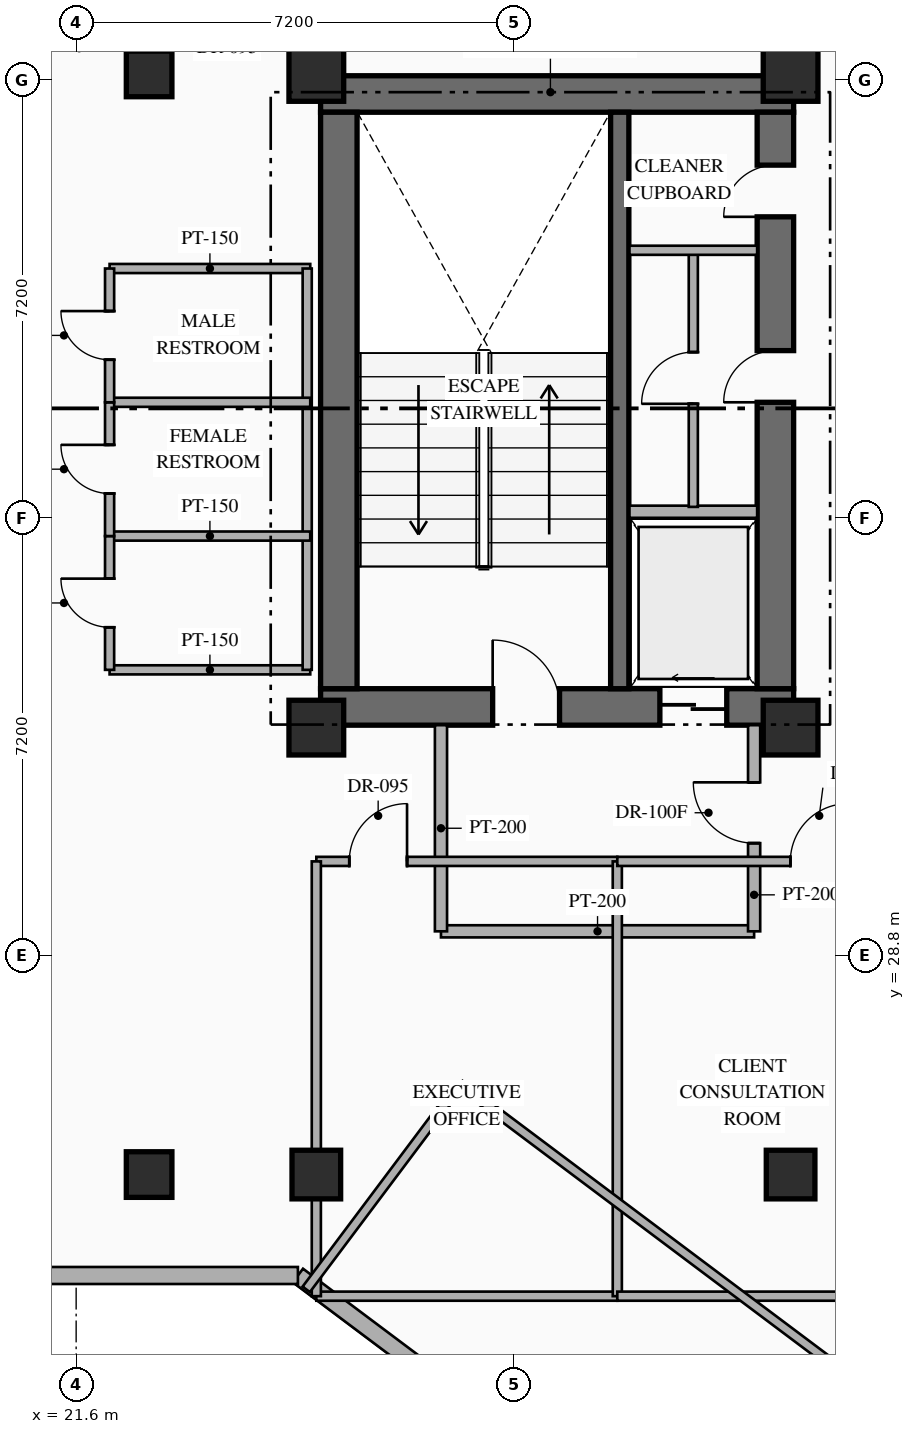
"""IFC4 building model, lengths in metres.
Left out: names, types, materials, properties, quantities, classifications, styles, units other than length and angle.
Written with IfcOpenShell. Run it as: python <this file> out.ifc"""

import sys

from ifc_helpers import new_model, si_unit, direction, frame, frame_2d, origin, origin_2d, place, context, subcontext, project, spatial, rectangle, hollow_rectangle, extrude, element, fill, save


model = new_model("IFC4")
c1 = context("Model", 3, precision=1e-05, world=origin(), true_north=direction((0.0, 1.0)))
c2 = subcontext(c1, "Body", "Model", "MODEL_VIEW")
j1 = project(units=[si_unit("LENGTHUNIT", "METRE"), si_unit("PLANEANGLEUNIT", "RADIAN")], contexts=[c1])
p1 = place(None, origin())
s1 = spatial("IfcSite", under=j1, at=p1, CompositionType="ELEMENT")
p2 = place(p1, origin())
s2 = spatial("IfcBuilding", under=s1, at=p2, CompositionType="ELEMENT")
p3 = place(p2, frame((0.0, 0.0, 174.45)))
s3 = spatial("IfcBuildingStorey", under=s2, at=p3, CompositionType="ELEMENT", Elevation=174.45)
p4 = place(p3, frame((25.62, 32.89, 0.0), z_axis=(0.0, 0.0, 1.0), x_axis=(1.0, 0.0, 0.0)))
e1 = element("IfcWall", 1, at=p4, inside=s3, PredefinedType="SHEAR", context=c2, shape_type="SweptSolid", body=[
    extrude(rectangle(XDim=7.78, YDim=0.6, at=frame_2d((3.89, 0.0))), origin(), (0.0, 0.0, 1.0), 3.6),
])
p5 = place(p4, frame((2.83, 0.0, 0.0)))
e2 = element("IfcOpeningElement", 2, at=p5, cuts=e1, PredefinedType="OPENING", context=c2, shape_type="SweptSolid", body=[
    extrude(rectangle(XDim=1.1, YDim=2.2, at=frame_2d((0.55, 1.1))), frame((0.0, 0.31, 0.0), z_axis=(0.0, -1.0, 0.0), x_axis=(1.0, 0.0, 0.0)), (0.0, 0.0, 1.0), 0.62),
])
p6 = place(p4, frame((5.58, 0.0, 0.0)))
e3 = element("IfcOpeningElement", 3, at=p6, cuts=e1, PredefinedType="OPENING", context=c2, shape_type="SweptSolid", body=[
    extrude(rectangle(XDim=1.1, YDim=2.15, at=frame_2d((0.55, 1.075))), frame((0.0, 0.31, 0.0), z_axis=(0.0, -1.0, 0.0), x_axis=(1.0, 0.0, 0.0)), (0.0, 0.0, 1.0), 0.62),
])
p7 = place(p3, frame((25.62, 42.97, 0.0), z_axis=(0.0, 0.0, 1.0), x_axis=(1.0, 0.0, 0.0)))
e4 = element("IfcWall", 4, at=p7, inside=s3, PredefinedType="SHEAR", context=c2, shape_type="SweptSolid", body=[
    extrude(rectangle(XDim=7.78, YDim=0.6, at=frame_2d((3.89, 0.0))), origin(), (0.0, 0.0, 1.0), 3.6),
])
p8 = place(p3, frame((25.92, 33.19, 0.0), z_axis=(0.0, 0.0, 1.0), x_axis=(0.0, 1.0, 0.0)))
e5 = element("IfcWall", 5, at=p8, inside=s3, PredefinedType="SHEAR", context=c2, shape_type="SweptSolid", body=[
    extrude(rectangle(XDim=9.48, YDim=0.6, at=frame_2d((4.74, 0.0))), origin(), (0.0, 0.0, 1.0), 3.6),
])
p9 = place(p3, frame((33.1, 33.19, 0.0), z_axis=(0.0, 0.0, 1.0), x_axis=(0.0, 1.0, 0.0)))
e6 = element("IfcWall", 6, at=p9, inside=s3, PredefinedType="SHEAR", context=c2, shape_type="SweptSolid", body=[
    extrude(rectangle(XDim=9.48, YDim=0.6, at=frame_2d((4.74, 0.0))), origin(), (0.0, 0.0, 1.0), 3.6),
])
p10 = place(p9, frame((4.71, 0.0, 0.0)))
e7 = element("IfcOpeningElement", 7, at=p10, cuts=e6, PredefinedType="OPENING", context=c2, shape_type="SweptSolid", body=[
    extrude(rectangle(XDim=0.85, YDim=2.08, at=frame_2d((0.425, 1.04))), frame((0.0, 0.31, 0.0), z_axis=(0.0, -1.0, 0.0), x_axis=(1.0, 0.0, 0.0)), (0.0, 0.0, 1.0), 0.62),
])
p11 = place(p9, frame((7.76, 0.0, 0.0)))
e8 = element("IfcOpeningElement", 8, at=p11, cuts=e6, PredefinedType="OPENING", context=c2, shape_type="SweptSolid", body=[
    extrude(rectangle(XDim=0.85, YDim=2.08, at=frame_2d((0.425, 1.04))), frame((0.0, 0.31, 0.0), z_axis=(0.0, -1.0, 0.0), x_axis=(1.0, 0.0, 0.0)), (0.0, 0.0, 1.0), 0.62),
])
p12 = place(p3, frame((30.54, 33.19, 0.0), z_axis=(0.0, 0.0, 1.0), x_axis=(0.0, 1.0, 0.0)))
e9 = element("IfcWall", 9, at=p12, inside=s3, PredefinedType="SHEAR", context=c2, shape_type="SweptSolid", body=[
    extrude(rectangle(XDim=9.48, YDim=0.3, at=frame_2d((4.74, 0.0))), origin(), (0.0, 0.0, 1.0), 3.6),
])
for number, where, z_axis, x_axis in (
    (10, (25.55, 32.55, 0.0), (0.0, 0.0, 1.0), (1.0, 0.0, 0.0)),
    (11, (33.35, 32.55, 0.0), (0.0, 0.0, 1.0), (1.0, 0.0, 0.0)),
    (12, (25.55, 43.3, 0.0), (0.0, 0.0, 1.0), (1.0, 0.0, 0.0)),
    (13, (33.35, 43.3, 0.0), (0.0, 0.0, 1.0), (1.0, 0.0, 0.0)),
):
    element("IfcColumn", number, at=place(p3, frame(where, z_axis=z_axis, x_axis=x_axis)), inside=s3, PredefinedType="COLUMN", context=c2, shape_type="SweptSolid", body=[
        extrude(rectangle(XDim=0.9, YDim=0.9, at=origin_2d()), origin(), (0.0, 0.0, 1.0), 3.6),
    ])
for number, where, z_axis, x_axis in (
    (14, (25.55, 25.2, 0.0), (0.0, 0.0, 1.0), (1.0, 0.0, 0.0)),
    (15, (33.35, 25.2, 0.0), (0.0, 0.0, 1.0), (1.0, 0.0, 0.0)),
):
    element("IfcColumn", number, at=place(p3, frame(where, z_axis=z_axis, x_axis=x_axis)), inside=s3, PredefinedType="COLUMN", context=c2, shape_type="SweptSolid", body=[
        extrude(hollow_rectangle(XDim=0.8, YDim=0.8, WallThickness=0.032, at=origin_2d()), origin(), (0.0, 0.0, 1.0), 3.6),
    ])
for number, where, z_axis, x_axis in (
    (16, (22.8, 25.2, 0.0), (0.0, 0.0, 1.0), (1.0, 0.0, 0.0)),
    (17, (22.8, 43.3, 0.0), (0.0, 0.0, 1.0), (1.0, 0.0, 0.0)),
):
    element("IfcColumn", number, at=place(p3, frame(where, z_axis=z_axis, x_axis=x_axis)), inside=s3, PredefinedType="COLUMN", context=c2, shape_type="SweptSolid", body=[
        extrude(hollow_rectangle(XDim=0.75, YDim=0.75, WallThickness=0.028, at=origin_2d()), origin(), (0.0, 0.0, 1.0), 3.6),
    ])
p13 = place(p3, frame((44.918, 8.787, 0.0), z_axis=(0.0, 0.0, 1.0), x_axis=(-0.800004765927, 0.599993645378, 0.0)))
e18 = element("IfcWall", 18, at=p13, inside=s3, PredefinedType="STANDARD", context=c2, shape_type="SweptSolid", body=[
    extrude(rectangle(XDim=24.588, YDim=0.28, at=frame_2d((12.294, 0.0))), origin(), (0.0, 0.0, 1.0), 3.35),
])
p14 = place(p3, frame((25.247, 23.54, 0.0), z_axis=(0.0, 0.0, 1.0), x_axis=(-1.0, 0.0, 0.0)))
e19 = element("IfcWall", 19, at=p14, inside=s3, PredefinedType="STANDARD", context=c2, shape_type="SweptSolid", body=[
    extrude(rectangle(XDim=6.747, YDim=0.28, at=frame_2d((3.374, 0.0))), origin(), (0.0, 0.0, 1.0), 3.35),
])
p15 = place(p3, frame((30.7, 36.1, 0.0), z_axis=(0.0, 0.0, 1.0), x_axis=(1.0, 0.0, 0.0)))
e20 = element("IfcWall", 20, at=p15, inside=s3, PredefinedType="STANDARD", context=c2, shape_type="SweptSolid", body=[
    extrude(rectangle(XDim=2.1, YDim=0.2, at=frame_2d((1.05, 0.0))), origin(), (0.0, 0.0, 1.0), 3.35),
])
p16 = place(p3, frame((31.75, 36.18, 0.0), z_axis=(0.0, 0.0, 1.0), x_axis=(0.0, 1.0, 0.0)))
e21 = element("IfcWall", 21, at=p16, inside=s3, PredefinedType="PARTITIONING", context=c2, shape_type="SweptSolid", body=[
    extrude(rectangle(XDim=4.24, YDim=0.15, at=frame_2d((2.12, 0.0))), origin(), (0.0, 0.0, 1.0), 3.35),
])
p17 = place(p16, frame((1.695, 0.0, 0.0)))
e22 = element("IfcOpeningElement", 22, at=p17, cuts=e21, PredefinedType="OPENING", context=c2, shape_type="SweptSolid", body=[
    extrude(rectangle(XDim=0.85, YDim=2.08, at=frame_2d((0.425, 1.04))), frame((0.0, 0.085, 0.0), z_axis=(0.0, -1.0, 0.0), x_axis=(1.0, 0.0, 0.0)), (0.0, 0.0, 1.0), 0.17),
])
p18 = place(p3, frame((30.7, 40.4, 0.0), z_axis=(0.0, 0.0, 1.0), x_axis=(1.0, 0.0, 0.0)))
e23 = element("IfcWall", 23, at=p18, inside=s3, PredefinedType="PARTITIONING", context=c2, shape_type="SweptSolid", body=[
    extrude(rectangle(XDim=2.1, YDim=0.15, at=frame_2d((1.05, 0.0))), origin(), (0.0, 0.0, 1.0), 3.35),
])
p19 = place(p3, frame((27.6, 29.2, 0.0), z_axis=(0.0, 0.0, 1.0), x_axis=(1.0, 0.0, 0.0)))
e24 = element("IfcWall", 24, at=p19, inside=s3, PredefinedType="STANDARD", context=c2, shape_type="SweptSolid", body=[
    extrude(rectangle(XDim=5.15, YDim=0.2, at=frame_2d((2.575, 0.0))), origin(), (0.0, 0.0, 1.0), 3.35),
])
p20 = place(p3, frame((27.6, 29.2, 0.0), z_axis=(0.0, 0.0, 1.0), x_axis=(0.0, 1.0, 0.0)))
e25 = element("IfcWall", 25, at=p20, inside=s3, PredefinedType="STANDARD", context=c2, shape_type="SweptSolid", body=[
    extrude(rectangle(XDim=3.39, YDim=0.2, at=frame_2d((1.695, 0.0))), origin(), (0.0, 0.0, 1.0), 3.35),
])
p21 = place(p3, frame((32.75, 29.2, 0.0), z_axis=(0.0, 0.0, 1.0), x_axis=(0.0, 1.0, 0.0)))
e26 = element("IfcWall", 26, at=p21, inside=s3, PredefinedType="STANDARD", context=c2, shape_type="SweptSolid", body=[
    extrude(rectangle(XDim=3.39, YDim=0.2, at=frame_2d((1.695, 0.0))), origin(), (0.0, 0.0, 1.0), 3.35),
])
p22 = place(p21, frame((1.45, 0.0, 0.0)))
e27 = element("IfcOpeningElement", 27, at=p22, cuts=e26, PredefinedType="OPENING", context=c2, shape_type="SweptSolid", body=[
    extrude(rectangle(XDim=1.0, YDim=2.2, at=frame_2d((0.5, 1.1))), frame((0.0, 0.11, 0.0), z_axis=(0.0, -1.0, 0.0), x_axis=(1.0, 0.0, 0.0)), (0.0, 0.0, 1.0), 0.22),
])
for number, where, z_axis, x_axis in (
    (28, (22.15, 33.5, 0.0), (0.0, 0.0, 1.0), (1.0, 0.0, 0.0)),
    (29, (22.15, 40.1, 0.0), (0.0, 0.0, 1.0), (1.0, 0.0, 0.0)),
):
    element("IfcWall", number, at=place(p3, frame(where, z_axis=z_axis, x_axis=x_axis)), inside=s3, PredefinedType="PARTITIONING", context=c2, shape_type="SweptSolid", body=[
        extrude(rectangle(XDim=3.3, YDim=0.15, at=frame_2d((1.65, 0.0))), origin(), (0.0, 0.0, 1.0), 3.35),
    ])
p23 = place(p3, frame((25.4, 33.5, 0.0), z_axis=(0.0, 0.0, 1.0), x_axis=(0.0, 1.0, 0.0)))
e30 = element("IfcWall", 30, at=p23, inside=s3, PredefinedType="PARTITIONING", context=c2, shape_type="SweptSolid", body=[
    extrude(rectangle(XDim=6.6, YDim=0.15, at=frame_2d((3.3, 0.0))), origin(), (0.0, 0.0, 1.0), 3.35),
])
for number, where, z_axis, x_axis in (
    (31, (22.15, 35.7, 0.0), (0.0, 0.0, 1.0), (1.0, 0.0, 0.0)),
    (32, (22.15, 37.9, 0.0), (0.0, 0.0, 1.0), (1.0, 0.0, 0.0)),
):
    element("IfcWall", number, at=place(p3, frame(where, z_axis=z_axis, x_axis=x_axis)), inside=s3, PredefinedType="PARTITIONING", context=c2, shape_type="SweptSolid", body=[
        extrude(rectangle(XDim=3.3, YDim=0.15, at=frame_2d((1.65, 0.0))), origin(), (0.0, 0.0, 1.0), 3.35),
    ])
p24 = place(p3, frame((22.15, 33.5, 0.0), z_axis=(0.0, 0.0, 1.0), x_axis=(0.0, 1.0, 0.0)))
e33 = element("IfcWall", 33, at=p24, inside=s3, PredefinedType="PARTITIONING", context=c2, shape_type="SweptSolid", body=[
    extrude(rectangle(XDim=2.2, YDim=0.15, at=frame_2d((1.1, 0.0))), origin(), (0.0, 0.0, 1.0), 3.35),
])
p25 = place(p24, frame((0.7, 0.0, 0.0)))
e34 = element("IfcOpeningElement", 34, at=p25, cuts=e33, PredefinedType="OPENING", context=c2, shape_type="SweptSolid", body=[
    extrude(rectangle(XDim=0.8, YDim=2.06, at=frame_2d((0.4, 1.03))), frame((0.0, 0.085, 0.0), z_axis=(0.0, -1.0, 0.0), x_axis=(1.0, 0.0, 0.0)), (0.0, 0.0, 1.0), 0.17),
])
p26 = place(p3, frame((22.15, 35.7, 0.0), z_axis=(0.0, 0.0, 1.0), x_axis=(0.0, 1.0, 0.0)))
e35 = element("IfcWall", 35, at=p26, inside=s3, PredefinedType="PARTITIONING", context=c2, shape_type="SweptSolid", body=[
    extrude(rectangle(XDim=2.2, YDim=0.15, at=frame_2d((1.1, 0.0))), origin(), (0.0, 0.0, 1.0), 3.35),
])
p27 = place(p26, frame((0.7, 0.0, 0.0)))
e36 = element("IfcOpeningElement", 36, at=p27, cuts=e35, PredefinedType="OPENING", context=c2, shape_type="SweptSolid", body=[
    extrude(rectangle(XDim=0.8, YDim=2.06, at=frame_2d((0.4, 1.03))), frame((0.0, 0.085, 0.0), z_axis=(0.0, -1.0, 0.0), x_axis=(1.0, 0.0, 0.0)), (0.0, 0.0, 1.0), 0.17),
])
p28 = place(p3, frame((22.15, 37.9, 0.0), z_axis=(0.0, 0.0, 1.0), x_axis=(0.0, 1.0, 0.0)))
e37 = element("IfcWall", 37, at=p28, inside=s3, PredefinedType="PARTITIONING", context=c2, shape_type="SweptSolid", body=[
    extrude(rectangle(XDim=2.2, YDim=0.15, at=frame_2d((1.1, 0.0))), origin(), (0.0, 0.0, 1.0), 3.35),
])
p29 = place(p28, frame((0.7, 0.0, 0.0)))
e38 = element("IfcOpeningElement", 38, at=p29, cuts=e37, PredefinedType="OPENING", context=c2, shape_type="SweptSolid", body=[
    extrude(rectangle(XDim=0.8, YDim=2.06, at=frame_2d((0.4, 1.03))), frame((0.0, 0.085, 0.0), z_axis=(0.0, -1.0, 0.0), x_axis=(1.0, 0.0, 0.0)), (0.0, 0.0, 1.0), 0.17),
])
p30 = place(p3, frame((25.55, 23.2, 0.0), z_axis=(0.0, 0.0, 1.0), x_axis=(1.0, 0.0, 0.0)))
e39 = element("IfcWall", 39, at=p30, inside=s3, PredefinedType="PARTITIONING", context=c2, shape_type="SweptSolid", body=[
    extrude(rectangle(XDim=4.95, YDim=0.15, at=frame_2d((2.475, 0.0))), origin(), (0.0, 0.0, 1.0), 3.35),
])
p31 = place(p3, frame((25.55, 30.35, 0.0), z_axis=(0.0, 0.0, 1.0), x_axis=(1.0, 0.0, 0.0)))
e40 = element("IfcWall", 40, at=p31, inside=s3, PredefinedType="PARTITIONING", context=c2, shape_type="SweptSolid", body=[
    extrude(rectangle(XDim=4.95, YDim=0.15, at=frame_2d((2.475, 0.0))), origin(), (0.0, 0.0, 1.0), 3.35),
])
p32 = place(p31, frame((0.542, 0.0, 0.0)))
e41 = element("IfcOpeningElement", 41, at=p32, cuts=e40, PredefinedType="OPENING", context=c2, shape_type="SweptSolid", body=[
    extrude(rectangle(XDim=0.95, YDim=2.15, at=frame_2d((0.475, 1.075))), frame((0.0, 0.085, 0.0), z_axis=(0.0, -1.0, 0.0), x_axis=(1.0, 0.0, 0.0)), (0.0, 0.0, 1.0), 0.17),
])
p33 = place(p3, frame((25.55, 23.2, 0.0), z_axis=(0.0, 0.0, 1.0), x_axis=(0.0, 1.0, 0.0)))
e42 = element("IfcWall", 42, at=p33, inside=s3, PredefinedType="PARTITIONING", context=c2, shape_type="SweptSolid", body=[
    extrude(rectangle(XDim=7.15, YDim=0.15, at=frame_2d((3.575, 0.0))), origin(), (0.0, 0.0, 1.0), 2.695),
])
p34 = place(p3, frame((30.5, 23.2, 0.0), z_axis=(0.0, 0.0, 1.0), x_axis=(0.0, 1.0, 0.0)))
e43 = element("IfcWall", 43, at=p34, inside=s3, PredefinedType="PARTITIONING", context=c2, shape_type="SweptSolid", body=[
    extrude(rectangle(XDim=7.15, YDim=0.15, at=frame_2d((3.575, 0.0))), origin(), (0.0, 0.0, 1.0), 3.35),
])
p35 = place(p3, frame((30.5, 23.2, 0.0), z_axis=(0.0, 0.0, 1.0), x_axis=(1.0, 0.0, 0.0)))
e44 = element("IfcWall", 44, at=p35, inside=s3, PredefinedType="PARTITIONING", context=c2, shape_type="SweptSolid", body=[
    extrude(rectangle(XDim=4.45, YDim=0.15, at=frame_2d((2.225, 0.0))), origin(), (0.0, 0.0, 1.0), 3.35),
])
p36 = place(p3, frame((30.5, 30.35, 0.0), z_axis=(0.0, 0.0, 1.0), x_axis=(1.0, 0.0, 0.0)))
e45 = element("IfcWall", 45, at=p36, inside=s3, PredefinedType="PARTITIONING", context=c2, shape_type="SweptSolid", body=[
    extrude(rectangle(XDim=4.45, YDim=0.15, at=frame_2d((2.225, 0.0))), origin(), (0.0, 0.0, 1.0), 3.35),
])
p37 = place(p36, frame((2.846, 0.0, 0.0)))
e46 = element("IfcOpeningElement", 46, at=p37, cuts=e45, PredefinedType="OPENING", context=c2, shape_type="SweptSolid", body=[
    extrude(rectangle(XDim=0.95, YDim=2.15, at=frame_2d((0.475, 1.075))), frame((0.0, 0.085, 0.0), z_axis=(0.0, -1.0, 0.0), x_axis=(1.0, 0.0, 0.0)), (0.0, 0.0, 1.0), 0.17),
])
p38 = place(p3, frame((27.91, 26.68, 0.0), z_axis=(0.0, 0.0, 1.0), x_axis=(0.800005938517, -0.599992081896, 0.0)))
e47 = element("IfcWall", 47, at=p38, inside=s3, PredefinedType="PARTITIONING", context=c2, shape_type="SweptSolid", body=[
    extrude(rectangle(XDim=14.8, YDim=0.15, at=frame_2d((7.4, 0.0))), origin(), (0.0, 0.0, 1.0), 3.35),
])
p39 = place(p38, frame((9.281, 0.0, 0.0)))
e48 = element("IfcOpeningElement", 48, at=p39, cuts=e47, PredefinedType="OPENING", context=c2, shape_type="SweptSolid", body=[
    extrude(rectangle(XDim=0.95, YDim=2.15, at=frame_2d((0.475, 1.075))), frame((0.0, 0.085, 0.0), z_axis=(0.0, -1.0, 0.0), x_axis=(1.0, 0.0, 0.0)), (0.0, 0.0, 1.0), 0.17),
])
p40 = place(p3, frame((25.384, 23.312, 0.0), z_axis=(0.0, 0.0, 1.0), x_axis=(0.599990721155, 0.80000695905, 0.0)))
e49 = element("IfcWall", 49, at=p40, inside=s3, PredefinedType="PARTITIONING", context=c2, shape_type="SweptSolid", body=[
    extrude(rectangle(XDim=4.21, YDim=0.15, at=frame_2d((2.105, 0.0))), origin(), (0.0, 0.0, 1.0), 3.35),
])
p41 = place(p5, origin())
e50 = element("IfcDoor", 50, at=p41, inside=s3, OperationType="SINGLE_SWING_LEFT", PredefinedType="DOOR", context=c2, shape_type="SweptSolid", body=[
    extrude(rectangle(XDim=1.1, YDim=2.2, at=frame_2d((0.55, 1.1))), frame((0.0, 0.025, 0.0), z_axis=(0.0, -1.0, 0.0), x_axis=(1.0, 0.0, 0.0)), (0.0, 0.0, 1.0), 0.05),
])
fill(e2, e50)
p42 = place(p6, origin())
e51 = element("IfcDoor", 51, at=p42, inside=s3, OperationType="SLIDING_TO_LEFT", PredefinedType="USERDEFINED", context=c2, shape_type="SweptSolid", body=[
    extrude(rectangle(XDim=1.1, YDim=2.15, at=frame_2d((0.55, 1.075))), frame((0.0, 0.025, 0.0), z_axis=(0.0, -1.0, 0.0), x_axis=(1.0, 0.0, 0.0)), (0.0, 0.0, 1.0), 0.05),
])
fill(e3, e51)
p43 = place(p10, origin())
e52 = element("IfcDoor", 52, at=p43, inside=s3, OperationType="SINGLE_SWING_LEFT", PredefinedType="DOOR", context=c2, shape_type="SweptSolid", body=[
    extrude(rectangle(XDim=0.85, YDim=2.08, at=frame_2d((0.425, 1.04))), frame((0.0, 0.025, 0.0), z_axis=(0.0, -1.0, 0.0), x_axis=(1.0, 0.0, 0.0)), (0.0, 0.0, 1.0), 0.05),
])
fill(e7, e52)
p44 = place(p11, origin())
e53 = element("IfcDoor", 53, at=p44, inside=s3, OperationType="SINGLE_SWING_LEFT", PredefinedType="DOOR", context=c2, shape_type="SweptSolid", body=[
    extrude(rectangle(XDim=0.85, YDim=2.08, at=frame_2d((0.425, 1.04))), frame((0.0, 0.025, 0.0), z_axis=(0.0, -1.0, 0.0), x_axis=(1.0, 0.0, 0.0)), (0.0, 0.0, 1.0), 0.05),
])
fill(e8, e53)
p45 = place(p17, origin())
e54 = element("IfcDoor", 54, at=p45, inside=s3, OperationType="SINGLE_SWING_LEFT", PredefinedType="DOOR", context=c2, shape_type="SweptSolid", body=[
    extrude(rectangle(XDim=0.85, YDim=2.08, at=frame_2d((0.425, 1.04))), frame((0.0, 0.025, 0.0), z_axis=(0.0, -1.0, 0.0), x_axis=(1.0, 0.0, 0.0)), (0.0, 0.0, 1.0), 0.05),
])
fill(e22, e54)
p46 = place(p22, origin())
e55 = element("IfcDoor", 55, at=p46, inside=s3, OperationType="SINGLE_SWING_RIGHT", PredefinedType="DOOR", context=c2, shape_type="SweptSolid", body=[
    extrude(rectangle(XDim=1.0, YDim=2.2, at=frame_2d((0.5, 1.1))), frame((0.0, 0.025, 0.0), z_axis=(0.0, -1.0, 0.0), x_axis=(1.0, 0.0, 0.0)), (0.0, 0.0, 1.0), 0.05),
])
fill(e27, e55)
p47 = place(p25, origin())
e56 = element("IfcDoor", 56, at=p47, inside=s3, OperationType="SINGLE_SWING_RIGHT", PredefinedType="DOOR", context=c2, shape_type="SweptSolid", body=[
    extrude(rectangle(XDim=0.8, YDim=2.06, at=frame_2d((0.4, 1.03))), frame((0.0, 0.025, 0.0), z_axis=(0.0, -1.0, 0.0), x_axis=(1.0, 0.0, 0.0)), (0.0, 0.0, 1.0), 0.05),
])
fill(e34, e56)
p48 = place(p27, origin())
e57 = element("IfcDoor", 57, at=p48, inside=s3, OperationType="SINGLE_SWING_RIGHT", PredefinedType="DOOR", context=c2, shape_type="SweptSolid", body=[
    extrude(rectangle(XDim=0.8, YDim=2.06, at=frame_2d((0.4, 1.03))), frame((0.0, 0.025, 0.0), z_axis=(0.0, -1.0, 0.0), x_axis=(1.0, 0.0, 0.0)), (0.0, 0.0, 1.0), 0.05),
])
fill(e36, e57)
p49 = place(p29, origin())
e58 = element("IfcDoor", 58, at=p49, inside=s3, OperationType="SINGLE_SWING_RIGHT", PredefinedType="DOOR", context=c2, shape_type="SweptSolid", body=[
    extrude(rectangle(XDim=0.8, YDim=2.06, at=frame_2d((0.4, 1.03))), frame((0.0, 0.025, 0.0), z_axis=(0.0, -1.0, 0.0), x_axis=(1.0, 0.0, 0.0)), (0.0, 0.0, 1.0), 0.05),
])
fill(e38, e58)
p50 = place(p32, origin())
e59 = element("IfcDoor", 59, at=p50, inside=s3, OperationType="SINGLE_SWING_RIGHT", PredefinedType="DOOR", context=c2, shape_type="SweptSolid", body=[
    extrude(rectangle(XDim=0.95, YDim=2.15, at=frame_2d((0.475, 1.075))), frame((0.0, 0.025, 0.0), z_axis=(0.0, -1.0, 0.0), x_axis=(1.0, 0.0, 0.0)), (0.0, 0.0, 1.0), 0.05),
])
fill(e41, e59)
p51 = place(p37, origin())
e60 = element("IfcDoor", 60, at=p51, inside=s3, OperationType="SINGLE_SWING_RIGHT", PredefinedType="DOOR", context=c2, shape_type="SweptSolid", body=[
    extrude(rectangle(XDim=0.95, YDim=2.15, at=frame_2d((0.475, 1.075))), frame((0.0, 0.025, 0.0), z_axis=(0.0, -1.0, 0.0), x_axis=(1.0, 0.0, 0.0)), (0.0, 0.0, 1.0), 0.05),
])
fill(e46, e60)
save(model, sys.argv[1])
